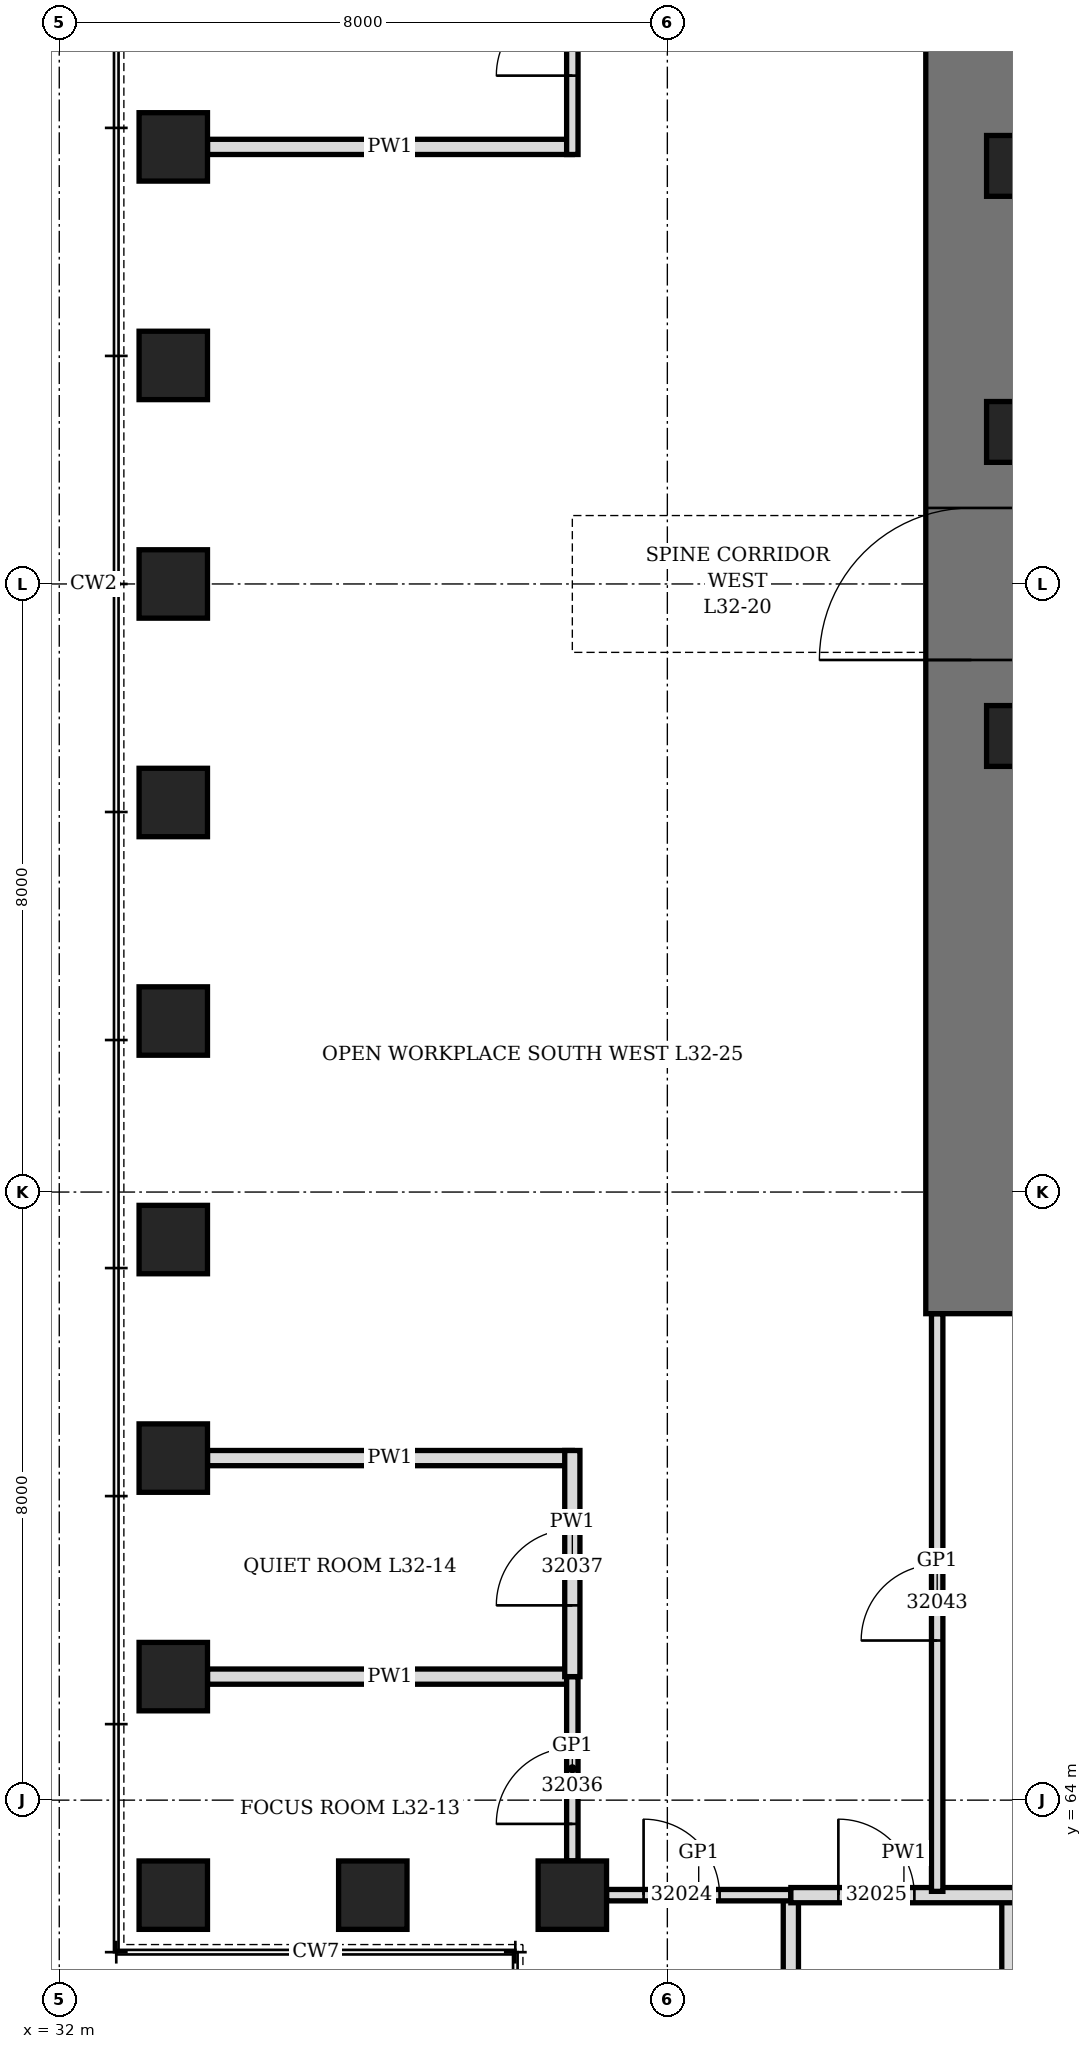
"""IFC4 building model, lengths in metres.
Left out: names, types, materials, properties, quantities, classifications, styles, units other than length and angle.
Written with IfcOpenShell. Run it as: python <this file> out.ifc"""

import sys

from ifc_helpers import new_model, si_unit, direction, frame, frame_2d, origin, origin_2d, place, context, subcontext, project, spatial, rectangle, hollow_rectangle, extrude, element, fill, save


model = new_model("IFC4")
c1 = context("Model", 3, precision=1e-05, world=origin(), true_north=direction((0.0, 1.0)))
c2 = subcontext(c1, "Body", "Model", "MODEL_VIEW")
j1 = project(units=[si_unit("LENGTHUNIT", "METRE"), si_unit("PLANEANGLEUNIT", "RADIAN")], contexts=[c1])
p1 = place(None, origin())
s1 = spatial("IfcSite", under=j1, at=p1, CompositionType="ELEMENT")
p2 = place(p1, origin())
s2 = spatial("IfcBuilding", under=s1, at=p2, CompositionType="ELEMENT")
p3 = place(p2, frame((0.0, 0.0, 145.9)))
s3 = spatial("IfcBuildingStorey", under=s2, at=p3, CompositionType="ELEMENT", Elevation=145.9)
for number, where, z_axis, x_axis in (
    (1, (33.5, 85.75, 0.0), (0.0, 0.0, 1.0), (0.0, 1.0, 0.0)),
    (2, (33.5, 82.875, 0.0), (0.0, 0.0, 1.0), (0.0, 1.0, 0.0)),
    (3, (33.5, 80.0, 0.0), (0.0, 0.0, 1.0), (0.0, 1.0, 0.0)),
    (4, (33.5, 77.125, 0.0), (0.0, 0.0, 1.0), (0.0, 1.0, 0.0)),
    (5, (33.5, 74.25, 0.0), (0.0, 0.0, 1.0), (0.0, 1.0, 0.0)),
    (6, (33.5, 71.375, 0.0), (0.0, 0.0, 1.0), (0.0, 1.0, 0.0)),
    (7, (33.5, 68.5, 0.0), (0.0, 0.0, 1.0), (0.0, 1.0, 0.0)),
    (8, (33.5, 65.625, 0.0), (0.0, 0.0, 1.0), (0.0, 1.0, 0.0)),
    (9, (33.5, 62.75, 0.0), (0.0, 0.0, 1.0), (1.0, 0.0, 0.0)),
    (10, (36.125, 62.75, 0.0), (0.0, 0.0, 1.0), (1.0, 0.0, 0.0)),
    (11, (38.75, 62.75, 0.0), (0.0, 0.0, 1.0), (0.0, 1.0, 0.0)),
):
    element("IfcColumn", number, at=place(p3, frame(where, z_axis=z_axis, x_axis=x_axis)), inside=s3, PredefinedType="COLUMN", context=c2, shape_type="SweptSolid", body=[
        extrude(hollow_rectangle(XDim=0.9, YDim=0.9, WallThickness=0.12, at=origin_2d()), origin(), (0.0, 0.0, 1.0), 4.2),
    ])
p4 = place(p3, frame((44.0, 70.4, 0.0), z_axis=(0.0, 0.0, 1.0), x_axis=(0.0, 1.0, 0.0)))
e12 = element("IfcWall", 12, at=p4, inside=s3, PredefinedType="SHEAR", context=c2, shape_type="SweptSolid", body=[
    extrude(rectangle(XDim=19.2, YDim=1.2, at=frame_2d((9.6, 0.0))), origin(), (0.0, 0.0, 1.0), 4.2),
])
p5 = place(p4, frame((8.6, 0.0, 0.0)))
e13 = element("IfcOpeningElement", 13, at=p5, cuts=e12, PredefinedType="OPENING", context=c2, shape_type="SweptSolid", body=[
    extrude(rectangle(XDim=2.0, YDim=2.4, at=frame_2d((1.0, 1.2))), frame((0.0, 0.61, 0.0), z_axis=(0.0, -1.0, 0.0), x_axis=(1.0, 0.0, 0.0)), (0.0, 0.0, 1.0), 1.22),
])
for number, where, z_axis, x_axis in (
    (14, (44.6, 78.0, 0.0), (0.0, 0.0, 1.0), (1.0, 0.0, 0.0)),
    (15, (44.6, 82.0, 0.0), (0.0, 0.0, 1.0), (1.0, 0.0, 0.0)),
    (16, (44.6, 85.5, 0.0), (0.0, 0.0, 1.0), (1.0, 0.0, 0.0)),
):
    element("IfcColumn", number, at=place(p3, frame(where, z_axis=z_axis, x_axis=x_axis)), inside=s3, PredefinedType="COLUMN", context=c2, shape_type="SweptSolid", body=[
        extrude(hollow_rectangle(XDim=0.8, YDim=0.8, WallThickness=0.1, at=origin_2d()), origin(), (0.0, 0.0, 1.0), 4.2),
    ])
p6 = place(p3, frame((41.625, 57.95, 0.0), z_axis=(0.0, 0.0, 1.0), x_axis=(0.0, 1.0, 0.0)))
e17 = element("IfcWall", 17, at=p6, inside=s3, PredefinedType="PARTITIONING", context=c2, shape_type="SweptSolid", body=[
    extrude(rectangle(XDim=4.8, YDim=0.2, at=frame_2d((2.4, 0.0))), origin(), (0.0, 0.0, 1.0), 3.428),
])
p7 = place(p3, frame((44.5, 57.95, 0.0), z_axis=(0.0, 0.0, 1.0), x_axis=(0.0, 1.0, 0.0)))
e18 = element("IfcWall", 18, at=p7, inside=s3, PredefinedType="PARTITIONING", context=c2, shape_type="SweptSolid", body=[
    extrude(rectangle(XDim=4.8, YDim=0.2, at=frame_2d((2.4, 0.0))), origin(), (0.0, 0.0, 1.0), 2.74),
])
for number, where, z_axis, x_axis in (
    (19, (33.95, 65.625, 0.0), (0.0, 0.0, 1.0), (1.0, 0.0, 0.0)),
    (20, (33.95, 68.5, 0.0), (0.0, 0.0, 1.0), (1.0, 0.0, 0.0)),
    (21, (33.95, 85.75, 0.0), (0.0, 0.0, 1.0), (1.0, 0.0, 0.0)),
):
    element("IfcWall", number, at=place(p3, frame(where, z_axis=z_axis, x_axis=x_axis)), inside=s3, PredefinedType="PARTITIONING", context=c2, shape_type="SweptSolid", body=[
        extrude(rectangle(XDim=4.8, YDim=0.2, at=frame_2d((2.4, 0.0))), origin(), (0.0, 0.0, 1.0), 3.428),
    ])
p8 = place(p3, frame((39.2, 62.75, 0.0), z_axis=(0.0, 0.0, 1.0), x_axis=(1.0, 0.0, 0.0)))
e22 = element("IfcWall", 22, at=p8, inside=s3, PredefinedType="PARTITIONING", context=c2, shape_type="SweptSolid", body=[
    extrude(rectangle(XDim=2.425, YDim=0.15, at=frame_2d((1.212, 0.0))), origin(), (0.0, 0.0, 1.0), 4.04),
])
p9 = place(p8, frame((0.488, 0.0, 0.0)))
e23 = element("IfcOpeningElement", 23, at=p9, cuts=e22, PredefinedType="OPENING", context=c2, shape_type="SweptSolid", body=[
    extrude(rectangle(XDim=1.0, YDim=2.4, at=frame_2d((0.5, 1.2))), frame((0.0, 0.085, 0.0), z_axis=(0.0, -1.0, 0.0), x_axis=(1.0, 0.0, 0.0)), (0.0, 0.0, 1.0), 0.17),
])
p10 = place(p3, frame((41.625, 62.75, 0.0), z_axis=(0.0, 0.0, 1.0), x_axis=(1.0, 0.0, 0.0)))
e24 = element("IfcWall", 24, at=p10, inside=s3, PredefinedType="PARTITIONING", context=c2, shape_type="SweptSolid", body=[
    extrude(rectangle(XDim=2.975, YDim=0.2, at=frame_2d((1.488, 0.0))), origin(), (0.0, 0.0, 1.0), 4.04),
])
p11 = place(p10, frame((0.625, 0.0, 0.0)))
e25 = element("IfcOpeningElement", 25, at=p11, cuts=e24, PredefinedType="OPENING", context=c2, shape_type="SweptSolid", body=[
    extrude(rectangle(XDim=1.0, YDim=2.1, at=frame_2d((0.5, 1.05))), frame((0.0, 0.11, 0.0), z_axis=(0.0, -1.0, 0.0), x_axis=(1.0, 0.0, 0.0)), (0.0, 0.0, 1.0), 0.22),
])
p12 = place(p3, frame((38.75, 63.2, 0.0), z_axis=(0.0, 0.0, 1.0), x_axis=(0.0, 1.0, 0.0)))
e26 = element("IfcWall", 26, at=p12, inside=s3, PredefinedType="PARTITIONING", context=c2, shape_type="SweptSolid", body=[
    extrude(rectangle(XDim=2.425, YDim=0.15, at=frame_2d((1.212, 0.0))), origin(), (0.0, 0.0, 1.0), 4.04),
])
p13 = place(p12, frame((0.488, 0.0, 0.0)))
e27 = element("IfcOpeningElement", 27, at=p13, cuts=e26, PredefinedType="OPENING", context=c2, shape_type="SweptSolid", body=[
    extrude(rectangle(XDim=1.0, YDim=2.4, at=frame_2d((0.5, 1.2))), frame((0.0, 0.085, 0.0), z_axis=(0.0, -1.0, 0.0), x_axis=(1.0, 0.0, 0.0)), (0.0, 0.0, 1.0), 0.17),
])
p14 = place(p3, frame((38.75, 85.65, 0.0), z_axis=(0.0, 0.0, 1.0), x_axis=(0.0, 1.0, 0.0)))
e28 = element("IfcWall", 28, at=p14, inside=s3, PredefinedType="PARTITIONING", context=c2, shape_type="SweptSolid", body=[
    extrude(rectangle(XDim=5.85, YDim=0.15, at=frame_2d((2.925, 0.0))), origin(), (0.0, 0.0, 1.0), 4.04),
])
p15 = place(p14, frame((1.038, 0.0, 0.0)))
e29 = element("IfcOpeningElement", 29, at=p15, cuts=e28, PredefinedType="OPENING", context=c2, shape_type="SweptSolid", body=[
    extrude(rectangle(XDim=1.0, YDim=2.1, at=frame_2d((0.5, 1.05))), frame((0.0, 0.085, 0.0), z_axis=(0.0, -1.0, 0.0), x_axis=(1.0, 0.0, 0.0)), (0.0, 0.0, 1.0), 0.17),
])
p16 = place(p3, frame((38.75, 65.625, 0.0), z_axis=(0.0, 0.0, 1.0), x_axis=(0.0, 1.0, 0.0)))
e30 = element("IfcWall", 30, at=p16, inside=s3, PredefinedType="PARTITIONING", context=c2, shape_type="SweptSolid", body=[
    extrude(rectangle(XDim=2.975, YDim=0.2, at=frame_2d((1.488, 0.0))), origin(), (0.0, 0.0, 1.0), 4.04),
])
p17 = place(p16, frame((0.938, 0.0, 0.0)))
e31 = element("IfcOpeningElement", 31, at=p17, cuts=e30, PredefinedType="OPENING", context=c2, shape_type="SweptSolid", body=[
    extrude(rectangle(XDim=1.0, YDim=2.1, at=frame_2d((0.5, 1.05))), frame((0.0, 0.11, 0.0), z_axis=(0.0, -1.0, 0.0), x_axis=(1.0, 0.0, 0.0)), (0.0, 0.0, 1.0), 0.22),
])
p18 = place(p3, frame((43.55, 62.8, 0.0), z_axis=(0.0, 0.0, 1.0), x_axis=(0.0, 1.0, 0.0)))
e32 = element("IfcWall", 32, at=p18, inside=s3, PredefinedType="PARTITIONING", context=c2, shape_type="SweptSolid", body=[
    extrude(rectangle(XDim=7.6, YDim=0.15, at=frame_2d((3.8, 0.0))), origin(), (0.0, 0.0, 1.0), 4.04),
])
p19 = place(p18, frame((3.3, 0.0, 0.0)))
e33 = element("IfcOpeningElement", 33, at=p19, cuts=e32, PredefinedType="OPENING", context=c2, shape_type="SweptSolid", body=[
    extrude(rectangle(XDim=1.0, YDim=2.4, at=frame_2d((0.5, 1.2))), frame((0.0, 0.085, 0.0), z_axis=(0.0, -1.0, 0.0), x_axis=(1.0, 0.0, 0.0)), (0.0, 0.0, 1.0), 0.17),
])
p20 = place(p5, origin())
e34 = element("IfcDoor", 34, at=p20, inside=s3, OperationType="DOUBLE_DOOR_SINGLE_SWING", PredefinedType="DOOR", context=c2, shape_type="SweptSolid", body=[
    extrude(rectangle(XDim=2.0, YDim=2.4, at=frame_2d((1.0, 1.2))), frame((0.0, 0.35, 0.0), z_axis=(0.0, -1.0, 0.0), x_axis=(1.0, 0.0, 0.0)), (0.0, 0.0, 1.0), 0.7),
])
fill(e13, e34)
p21 = place(p9, origin())
e35 = element("IfcDoor", 35, at=p21, inside=s3, OperationType="SINGLE_SWING_RIGHT", PredefinedType="DOOR", context=c2, shape_type="SweptSolid", body=[
    extrude(rectangle(XDim=1.0, YDim=2.4, at=frame_2d((0.5, 1.2))), frame((0.0, 0.075, 0.0), z_axis=(0.0, -1.0, 0.0), x_axis=(1.0, 0.0, 0.0)), (0.0, 0.0, 1.0), 0.149),
])
fill(e23, e35)
p22 = place(p11, origin())
e36 = element("IfcDoor", 36, at=p22, inside=s3, OperationType="SINGLE_SWING_LEFT", PredefinedType="DOOR", context=c2, shape_type="SweptSolid", body=[
    extrude(rectangle(XDim=1.0, YDim=2.1, at=frame_2d((0.5, 1.05))), frame((0.0, 0.1, 0.0), z_axis=(0.0, -1.0, 0.0), x_axis=(1.0, 0.0, 0.0)), (0.0, 0.0, 1.0), 0.199),
])
fill(e25, e36)
p23 = place(p13, origin())
e37 = element("IfcDoor", 37, at=p23, inside=s3, OperationType="SINGLE_SWING_RIGHT", PredefinedType="DOOR", context=c2, shape_type="SweptSolid", body=[
    extrude(rectangle(XDim=1.0, YDim=2.4, at=frame_2d((0.5, 1.2))), frame((0.0, 0.075, 0.0), z_axis=(0.0, -1.0, 0.0), x_axis=(1.0, 0.0, 0.0)), (0.0, 0.0, 1.0), 0.149),
])
fill(e27, e37)
p24 = place(p17, origin())
e38 = element("IfcDoor", 38, at=p24, inside=s3, OperationType="SINGLE_SWING_LEFT", PredefinedType="DOOR", context=c2, shape_type="SweptSolid", body=[
    extrude(rectangle(XDim=1.0, YDim=2.1, at=frame_2d((0.5, 1.05))), frame((0.0, 0.1, 0.0), z_axis=(0.0, -1.0, 0.0), x_axis=(1.0, 0.0, 0.0)), (0.0, 0.0, 1.0), 0.199),
])
fill(e31, e38)
p25 = place(p15, origin())
e39 = element("IfcDoor", 39, at=p25, inside=s3, OperationType="SINGLE_SWING_LEFT", PredefinedType="DOOR", context=c2, shape_type="SweptSolid", body=[
    extrude(rectangle(XDim=1.0, YDim=2.1, at=frame_2d((0.5, 1.05))), frame((0.0, 0.075, 0.0), z_axis=(0.0, -1.0, 0.0), x_axis=(1.0, 0.0, 0.0)), (0.0, 0.0, 1.0), 0.149),
])
fill(e29, e39)
p26 = place(p19, origin())
e40 = element("IfcDoor", 40, at=p26, inside=s3, OperationType="SINGLE_SWING_RIGHT", PredefinedType="DOOR", context=c2, shape_type="SweptSolid", body=[
    extrude(rectangle(XDim=1.0, YDim=2.4, at=frame_2d((0.5, 1.2))), frame((0.0, 0.075, 0.0), z_axis=(0.0, -1.0, 0.0), x_axis=(1.0, 0.0, 0.0)), (0.0, 0.0, 1.0), 0.149),
])
fill(e33, e40)
save(model, sys.argv[1])
